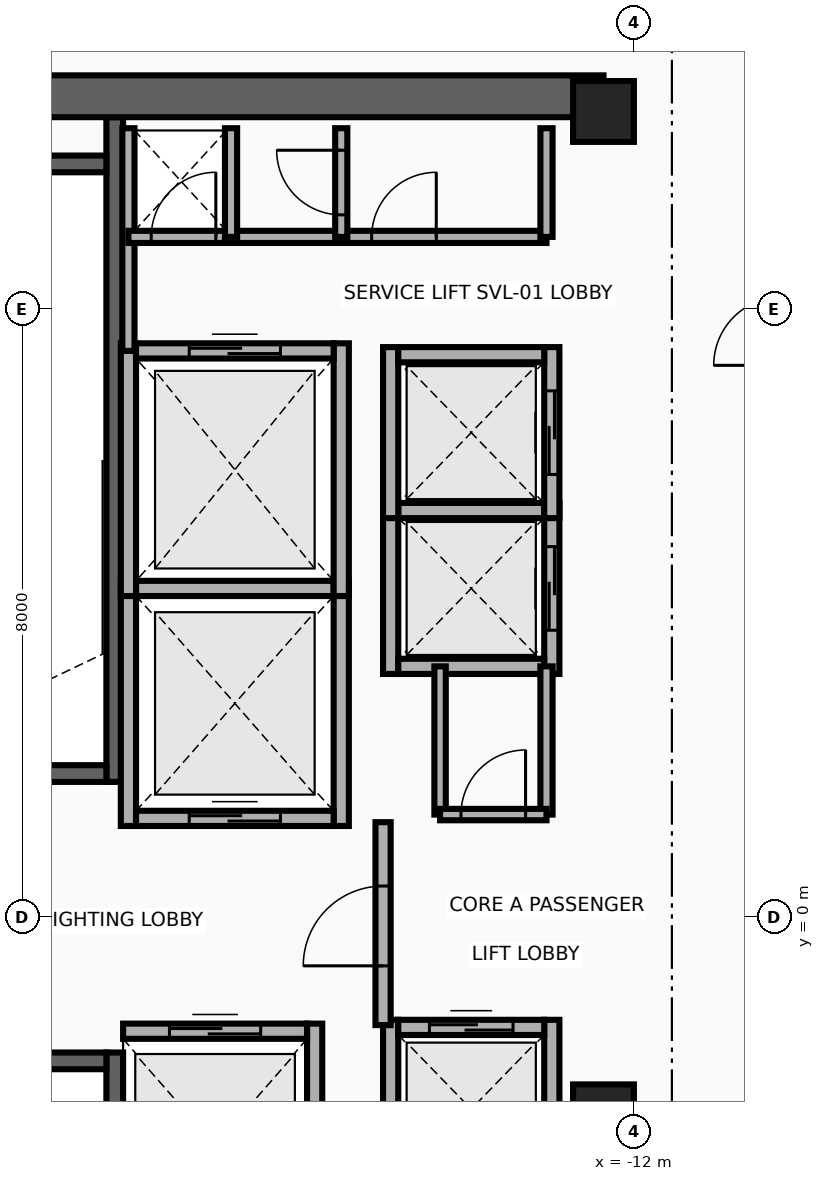
"""IFC4 building model, lengths in metres.
Left out: names, types, materials, properties, quantities, classifications, styles, units other than length and angle.
Written with IfcOpenShell. Run it as: python <this file> out.ifc"""

import sys

from ifc_helpers import new_model, si_unit, direction, frame, frame_2d, origin, origin_2d, place, context, subcontext, project, spatial, rectangle, extrude, source, transform, mapped, element, fill, save


model = new_model("IFC4")
c1 = context("Model", 3, precision=1e-05, world=origin(), true_north=direction((0.0, 1.0)))
c2 = subcontext(c1, "Body", "Model", "MODEL_VIEW")
j1 = project(units=[si_unit("LENGTHUNIT", "METRE"), si_unit("PLANEANGLEUNIT", "RADIAN")], contexts=[c1])
p1 = place(None, origin())
s1 = spatial("IfcSite", under=j1, at=p1, CompositionType="ELEMENT")
p2 = place(p1, origin())
s2 = spatial("IfcBuilding", under=s1, at=p2, CompositionType="ELEMENT")
p3 = place(p2, frame((0.0, 0.0, 254.5)))
s3 = spatial("IfcBuildingStorey", under=s2, at=p3, CompositionType="ELEMENT", Elevation=254.5)
p4 = place(p3, frame((-18.83, 1.78, 0.0), z_axis=(0.0, 0.0, 1.0), x_axis=(0.0, 1.0, 0.0)))
e1 = element("IfcWall", 1, at=p4, inside=s3, PredefinedType="SHEAR", context=c2, shape_type="SweptSolid", body=[
    extrude(rectangle(XDim=8.745, YDim=0.22, at=frame_2d((4.373, 0.0))), origin(), (0.0, 0.0, 1.0), 3.26),
])
p5 = place(p3, frame((-22.05, 1.89, 0.0), z_axis=(0.0, 0.0, 1.0), x_axis=(1.0, 0.0, 0.0)))
e2 = element("IfcWall", 2, at=p5, inside=s3, PredefinedType="SHEAR", context=c2, shape_type="SweptSolid", body=[
    extrude(rectangle(XDim=3.11, YDim=0.22, at=frame_2d((1.555, 0.0))), origin(), (0.0, 0.0, 1.0), 3.26),
])
p6 = place(p5, frame((1.0, 0.0, 0.0)))
e3 = element("IfcOpeningElement", 3, at=p6, cuts=e2, PredefinedType="OPENING", context=c2, shape_type="SweptSolid", body=[
    extrude(rectangle(XDim=1.1, YDim=2.15, at=frame_2d((0.55, 1.075))), frame((0.0, 0.125, 0.0), z_axis=(0.0, -1.0, 0.0), x_axis=(1.0, 0.0, 0.0)), (0.0, 0.0, 1.0), 0.25),
])
p7 = place(p3, frame((-22.05, 9.91, 0.0), z_axis=(0.0, 0.0, 1.0), x_axis=(1.0, 0.0, 0.0)))
e4 = element("IfcWall", 4, at=p7, inside=s3, PredefinedType="SHEAR", context=c2, shape_type="SweptSolid", body=[
    extrude(rectangle(XDim=3.11, YDim=0.22, at=frame_2d((1.555, 0.0))), origin(), (0.0, 0.0, 1.0), 3.26),
])
p8 = place(p3, frame((-18.83, -10.525, 0.0), z_axis=(0.0, 0.0, 1.0), x_axis=(0.0, 1.0, 0.0)))
e5 = element("IfcWall", 5, at=p8, inside=s3, PredefinedType="SHEAR", context=c2, shape_type="SweptSolid", body=[
    extrude(rectangle(XDim=8.745, YDim=0.22, at=frame_2d((4.373, 0.0))), origin(), (0.0, 0.0, 1.0), 3.26),
])
p9 = place(p3, frame((-22.05, -1.89, 0.0), z_axis=(0.0, 0.0, 1.0), x_axis=(1.0, 0.0, 0.0)))
e6 = element("IfcWall", 6, at=p9, inside=s3, PredefinedType="SHEAR", context=c2, shape_type="SweptSolid", body=[
    extrude(rectangle(XDim=3.11, YDim=0.22, at=frame_2d((1.555, 0.0))), origin(), (0.0, 0.0, 1.0), 3.26),
])
p10 = place(p9, frame((1.0, 0.0, 0.0)))
e7 = element("IfcOpeningElement", 7, at=p10, cuts=e6, PredefinedType="OPENING", context=c2, shape_type="SweptSolid", body=[
    extrude(rectangle(XDim=1.1, YDim=2.15, at=frame_2d((0.55, 1.075))), frame((0.0, 0.125, 0.0), z_axis=(0.0, -1.0, 0.0), x_axis=(1.0, 0.0, 0.0)), (0.0, 0.0, 1.0), 0.25),
])
p11 = place(p3, frame((-22.65, 10.8, 0.0), z_axis=(0.0, 0.0, 1.0), x_axis=(1.0, 0.0, 0.0)))
e8 = element("IfcWall", 8, at=p11, inside=s3, PredefinedType="SHEAR", context=c2, shape_type="SweptSolid", body=[
    extrude(rectangle(XDim=10.25, YDim=0.55, at=frame_2d((5.125, 0.0))), origin(), (0.0, 0.0, 1.0), 3.26),
])
m1 = source(origin(), c2, "Body", "SweptSolid", [
    extrude(rectangle(XDim=0.8, YDim=0.8, at=origin_2d()), origin(), (0.0, 0.0, 1.0), 3.5),
])
for number, where, z_axis, x_axis in (
    (9, (-12.4, -2.6, 0.0), (0.0, 0.0, 1.0), (1.0, 0.0, 0.0)),
    (10, (-12.4, 10.6, 0.0), (0.0, 0.0, 1.0), (1.0, 0.0, 0.0)),
):
    element("IfcColumn", number, at=place(p3, frame(where, z_axis=z_axis, x_axis=x_axis)), inside=s3, PredefinedType="COLUMN", context=c2, shape_type="MappedRepresentation", body=[
        mapped(m1, transform((0.0, 0.0, 0.0), x_axis=(1.0, 0.0, 0.0), y_axis=(0.0, 1.0, 0.0), z_axis=(0.0, 0.0, 1.0), scale=1.0)),
    ])
for number, where, z_axis, x_axis in (
    (11, (-18.65, 1.2, 0.0), (0.0, 0.0, 1.0), (0.0, 1.0, 0.0)),
    (12, (-15.85, 1.2, 0.0), (0.0, 0.0, 1.0), (0.0, 1.0, 0.0)),
):
    element("IfcWall", number, at=place(p3, frame(where, z_axis=z_axis, x_axis=x_axis)), inside=s3, PredefinedType="MOVABLE", context=c2, shape_type="SweptSolid", body=[
        extrude(rectangle(XDim=3.225, YDim=0.2, at=frame_2d((1.613, 0.0))), origin(), (0.0, 0.0, 1.0), 3.26),
    ])
p12 = place(p3, frame((-18.55, 1.3, 0.0), z_axis=(0.0, 0.0, 1.0), x_axis=(1.0, 0.0, 0.0)))
e13 = element("IfcWall", 13, at=p12, inside=s3, PredefinedType="MOVABLE", context=c2, shape_type="SweptSolid", body=[
    extrude(rectangle(XDim=2.6, YDim=0.2, at=frame_2d((1.3, 0.0))), origin(), (0.0, 0.0, 1.0), 3.26),
])
p13 = place(p12, frame((0.7, 0.0, 0.0)))
e14 = element("IfcOpeningElement", 14, at=p13, cuts=e13, PredefinedType="OPENING", context=c2, shape_type="SweptSolid", body=[
    extrude(rectangle(XDim=1.2, YDim=2.1, at=frame_2d((0.6, 1.05))), frame((0.0, 0.115, 0.0), z_axis=(0.0, -1.0, 0.0), x_axis=(1.0, 0.0, 0.0)), (0.0, 0.0, 1.0), 0.23),
])
p14 = place(p3, frame((-18.55, 4.325, 0.0), z_axis=(0.0, 0.0, 1.0), x_axis=(1.0, 0.0, 0.0)))
e15 = element("IfcWall", 15, at=p14, inside=s3, PredefinedType="MOVABLE", context=c2, shape_type="SweptSolid", body=[
    extrude(rectangle(XDim=2.6, YDim=0.2, at=frame_2d((1.3, 0.0))), origin(), (0.0, 0.0, 1.0), 3.26),
])
p15 = place(p3, frame((-16.2, -4.6, 0.0), z_axis=(0.0, 0.0, 1.0), x_axis=(0.0, 1.0, 0.0)))
e16 = element("IfcWall", 16, at=p15, inside=s3, PredefinedType="MOVABLE", context=c2, shape_type="SweptSolid", body=[
    extrude(rectangle(XDim=3.2, YDim=0.2, at=frame_2d((1.6, 0.0))), origin(), (0.0, 0.0, 1.0), 3.26),
])
p16 = place(p3, frame((-18.72, -1.5, 0.0), z_axis=(0.0, 0.0, 1.0), x_axis=(1.0, 0.0, 0.0)))
e17 = element("IfcWall", 17, at=p16, inside=s3, PredefinedType="MOVABLE", context=c2, shape_type="SweptSolid", body=[
    extrude(rectangle(XDim=2.42, YDim=0.2, at=frame_2d((1.21, 0.0))), origin(), (0.0, 0.0, 1.0), 3.26),
])
p17 = place(p16, frame((0.61, 0.0, 0.0)))
e18 = element("IfcOpeningElement", 18, at=p17, cuts=e17, PredefinedType="OPENING", context=c2, shape_type="SweptSolid", body=[
    extrude(rectangle(XDim=1.2, YDim=2.1, at=frame_2d((0.6, 1.05))), frame((0.0, 0.115, 0.0), z_axis=(0.0, -1.0, 0.0), x_axis=(1.0, 0.0, 0.0)), (0.0, 0.0, 1.0), 0.23),
])
for number, where, z_axis, x_axis in (
    (19, (-18.65, 4.225, 0.0), (0.0, 0.0, 1.0), (0.0, 1.0, 0.0)),
    (20, (-15.85, 4.225, 0.0), (0.0, 0.0, 1.0), (0.0, 1.0, 0.0)),
):
    element("IfcWall", number, at=place(p3, frame(where, z_axis=z_axis, x_axis=x_axis)), inside=s3, PredefinedType="MOVABLE", context=c2, shape_type="SweptSolid", body=[
        extrude(rectangle(XDim=3.325, YDim=0.2, at=frame_2d((1.663, 0.0))), origin(), (0.0, 0.0, 1.0), 3.26),
    ])
p18 = place(p3, frame((-18.55, 7.45, 0.0), z_axis=(0.0, 0.0, 1.0), x_axis=(1.0, 0.0, 0.0)))
e21 = element("IfcWall", 21, at=p18, inside=s3, PredefinedType="MOVABLE", context=c2, shape_type="SweptSolid", body=[
    extrude(rectangle(XDim=2.6, YDim=0.2, at=frame_2d((1.3, 0.0))), origin(), (0.0, 0.0, 1.0), 3.26),
])
p19 = place(p18, frame((0.7, 0.0, 0.0)))
e22 = element("IfcOpeningElement", 22, at=p19, cuts=e21, PredefinedType="OPENING", context=c2, shape_type="SweptSolid", body=[
    extrude(rectangle(XDim=1.2, YDim=2.1, at=frame_2d((0.6, 1.05))), frame((0.0, 0.115, 0.0), z_axis=(0.0, -1.0, 0.0), x_axis=(1.0, 0.0, 0.0)), (0.0, 0.0, 1.0), 0.23),
])
p20 = place(p3, frame((-15.2, 3.2, 0.0), z_axis=(0.0, 0.0, 1.0), x_axis=(0.0, 1.0, 0.0)))
e23 = element("IfcWall", 23, at=p20, inside=s3, PredefinedType="MOVABLE", context=c2, shape_type="SweptSolid", body=[
    extrude(rectangle(XDim=2.25, YDim=0.2, at=frame_2d((1.125, 0.0))), origin(), (0.0, 0.0, 1.0), 3.26),
])
p21 = place(p3, frame((-13.08, 3.2, 0.0), z_axis=(0.0, 0.0, 1.0), x_axis=(0.0, 1.0, 0.0)))
e24 = element("IfcWall", 24, at=p21, inside=s3, PredefinedType="MOVABLE", context=c2, shape_type="SweptSolid", body=[
    extrude(rectangle(XDim=2.25, YDim=0.2, at=frame_2d((1.125, 0.0))), origin(), (0.0, 0.0, 1.0), 3.26),
])
p22 = place(p21, frame((0.575, 0.0, 0.0)))
e25 = element("IfcOpeningElement", 25, at=p22, cuts=e24, PredefinedType="OPENING", context=c2, shape_type="SweptSolid", body=[
    extrude(rectangle(XDim=1.1, YDim=2.1, at=frame_2d((0.55, 1.05))), frame((0.0, 0.115, 0.0), z_axis=(0.0, -1.0, 0.0), x_axis=(1.0, 0.0, 0.0)), (0.0, 0.0, 1.0), 0.23),
])
for number, where, z_axis, x_axis in (
    (26, (-15.1, 3.3, 0.0), (0.0, 0.0, 1.0), (1.0, 0.0, 0.0)),
    (27, (-15.1, 5.35, 0.0), (0.0, 0.0, 1.0), (1.0, 0.0, 0.0)),
):
    element("IfcWall", number, at=place(p3, frame(where, z_axis=z_axis, x_axis=x_axis)), inside=s3, PredefinedType="MOVABLE", context=c2, shape_type="SweptSolid", body=[
        extrude(rectangle(XDim=1.92, YDim=0.2, at=frame_2d((0.96, 0.0))), origin(), (0.0, 0.0, 1.0), 3.26),
    ])
p23 = place(p3, frame((-15.2, 5.25, 0.0), z_axis=(0.0, 0.0, 1.0), x_axis=(0.0, 1.0, 0.0)))
e28 = element("IfcWall", 28, at=p23, inside=s3, PredefinedType="MOVABLE", context=c2, shape_type="SweptSolid", body=[
    extrude(rectangle(XDim=2.25, YDim=0.2, at=frame_2d((1.125, 0.0))), origin(), (0.0, 0.0, 1.0), 3.26),
])
p24 = place(p3, frame((-13.08, 5.25, 0.0), z_axis=(0.0, 0.0, 1.0), x_axis=(0.0, 1.0, 0.0)))
e29 = element("IfcWall", 29, at=p24, inside=s3, PredefinedType="MOVABLE", context=c2, shape_type="SweptSolid", body=[
    extrude(rectangle(XDim=2.25, YDim=0.2, at=frame_2d((1.125, 0.0))), origin(), (0.0, 0.0, 1.0), 3.26),
])
p25 = place(p24, frame((0.575, 0.0, 0.0)))
e30 = element("IfcOpeningElement", 30, at=p25, cuts=e29, PredefinedType="OPENING", context=c2, shape_type="SweptSolid", body=[
    extrude(rectangle(XDim=1.1, YDim=2.1, at=frame_2d((0.55, 1.05))), frame((0.0, 0.115, 0.0), z_axis=(0.0, -1.0, 0.0), x_axis=(1.0, 0.0, 0.0)), (0.0, 0.0, 1.0), 0.23),
])
p26 = place(p3, frame((-15.1, 7.4, 0.0), z_axis=(0.0, 0.0, 1.0), x_axis=(1.0, 0.0, 0.0)))
e31 = element("IfcWall", 31, at=p26, inside=s3, PredefinedType="MOVABLE", context=c2, shape_type="SweptSolid", body=[
    extrude(rectangle(XDim=1.92, YDim=0.2, at=frame_2d((0.96, 0.0))), origin(), (0.0, 0.0, 1.0), 3.26),
])
for number, where, z_axis, x_axis in (
    (32, (-15.2, -3.7, 0.0), (0.0, 0.0, 1.0), (0.0, 1.0, 0.0)),
    (33, (-13.08, -3.7, 0.0), (0.0, 0.0, 1.0), (0.0, 1.0, 0.0)),
):
    element("IfcWall", number, at=place(p3, frame(where, z_axis=z_axis, x_axis=x_axis)), inside=s3, PredefinedType="MOVABLE", context=c2, shape_type="SweptSolid", body=[
        extrude(rectangle(XDim=2.35, YDim=0.2, at=frame_2d((1.175, 0.0))), origin(), (0.0, 0.0, 1.0), 3.26),
    ])
p27 = place(p3, frame((-15.1, -1.45, 0.0), z_axis=(0.0, 0.0, 1.0), x_axis=(1.0, 0.0, 0.0)))
e34 = element("IfcWall", 34, at=p27, inside=s3, PredefinedType="MOVABLE", context=c2, shape_type="SweptSolid", body=[
    extrude(rectangle(XDim=1.92, YDim=0.2, at=frame_2d((0.96, 0.0))), origin(), (0.0, 0.0, 1.0), 3.26),
])
p28 = place(p27, frame((0.41, 0.0, 0.0)))
e35 = element("IfcOpeningElement", 35, at=p28, cuts=e34, PredefinedType="OPENING", context=c2, shape_type="SweptSolid", body=[
    extrude(rectangle(XDim=1.1, YDim=2.1, at=frame_2d((0.55, 1.05))), frame((0.0, 0.115, 0.0), z_axis=(0.0, -1.0, 0.0), x_axis=(1.0, 0.0, 0.0)), (0.0, 0.0, 1.0), 0.23),
])
p29 = place(p3, frame((-15.3, -1.42, 0.0), z_axis=(0.0, 0.0, 1.0), x_axis=(0.0, 1.0, 0.0)))
e36 = element("IfcWall", 36, at=p29, inside=s3, PredefinedType="PARTITIONING", context=c2, shape_type="SweptSolid", body=[
    extrude(rectangle(XDim=2.67, YDim=0.2, at=frame_2d((1.335, 0.0))), origin(), (0.0, 0.0, 1.0), 3.26),
])
p30 = place(p29, frame((0.78, 0.0, 0.0)))
e37 = element("IfcOpeningElement", 37, at=p30, cuts=e36, PredefinedType="OPENING", context=c2, shape_type="SweptSolid", body=[
    extrude(rectangle(XDim=1.05, YDim=2.15, at=frame_2d((0.525, 1.075))), frame((0.0, 0.115, 0.0), z_axis=(0.0, -1.0, 0.0), x_axis=(1.0, 0.0, 0.0)), (0.0, 0.0, 1.0), 0.23),
])
p31 = place(p3, frame((-18.65, 7.45, 0.0), z_axis=(0.0, 0.0, 1.0), x_axis=(0.0, 1.0, 0.0)))
e38 = element("IfcWall", 38, at=p31, inside=s3, PredefinedType="PARTITIONING", context=c2, shape_type="SweptSolid", body=[
    extrude(rectangle(XDim=2.93, YDim=0.16, at=frame_2d((1.465, 0.0))), origin(), (0.0, 0.0, 1.0), 3.26),
])
p32 = place(p3, frame((-18.65, 8.95, 0.0), z_axis=(0.0, 0.0, 1.0), x_axis=(1.0, 0.0, 0.0)))
e39 = element("IfcWall", 39, at=p32, inside=s3, PredefinedType="PARTITIONING", context=c2, shape_type="SweptSolid", body=[
    extrude(rectangle(XDim=5.5, YDim=0.16, at=frame_2d((2.75, 0.0))), origin(), (0.0, 0.0, 1.0), 3.26),
])
p33 = place(p32, frame((0.3, 0.0, 0.0)))
e40 = element("IfcOpeningElement", 40, at=p33, cuts=e39, PredefinedType="OPENING", context=c2, shape_type="SweptSolid", body=[
    extrude(rectangle(XDim=0.85, YDim=2.05, at=frame_2d((0.425, 1.025))), frame((0.0, 0.095, 0.0), z_axis=(0.0, -1.0, 0.0), x_axis=(1.0, 0.0, 0.0)), (0.0, 0.0, 1.0), 0.19),
])
p34 = place(p32, frame((3.2, 0.0, 0.0)))
e41 = element("IfcOpeningElement", 41, at=p34, cuts=e39, PredefinedType="OPENING", context=c2, shape_type="SweptSolid", body=[
    extrude(rectangle(XDim=0.85, YDim=2.05, at=frame_2d((0.425, 1.025))), frame((0.0, 0.095, 0.0), z_axis=(0.0, -1.0, 0.0), x_axis=(1.0, 0.0, 0.0)), (0.0, 0.0, 1.0), 0.19),
])
for number, where, z_axis, x_axis in (
    (42, (-13.15, 8.95, 0.0), (0.0, 0.0, 1.0), (0.0, 1.0, 0.0)),
    (43, (-17.3, 8.95, 0.0), (0.0, 0.0, 1.0), (0.0, 1.0, 0.0)),
):
    element("IfcWall", number, at=place(p3, frame(where, z_axis=z_axis, x_axis=x_axis)), inside=s3, PredefinedType="PARTITIONING", context=c2, shape_type="SweptSolid", body=[
        extrude(rectangle(XDim=1.43, YDim=0.16, at=frame_2d((0.715, 0.0))), origin(), (0.0, 0.0, 1.0), 3.26),
    ])
p35 = place(p3, frame((-15.85, 8.95, 0.0), z_axis=(0.0, 0.0, 1.0), x_axis=(0.0, 1.0, 0.0)))
e44 = element("IfcWall", 44, at=p35, inside=s3, PredefinedType="PARTITIONING", context=c2, shape_type="SweptSolid", body=[
    extrude(rectangle(XDim=1.43, YDim=0.16, at=frame_2d((0.715, 0.0))), origin(), (0.0, 0.0, 1.0), 3.26),
])
p36 = place(p35, frame((0.29, 0.0, 0.0)))
e45 = element("IfcOpeningElement", 45, at=p36, cuts=e44, PredefinedType="OPENING", context=c2, shape_type="SweptSolid", body=[
    extrude(rectangle(XDim=0.85, YDim=2.05, at=frame_2d((0.425, 1.025))), frame((0.0, 0.095, 0.0), z_axis=(0.0, -1.0, 0.0), x_axis=(1.0, 0.0, 0.0)), (0.0, 0.0, 1.0), 0.19),
])
p37 = place(p3, frame((-13.15, 1.35, 0.0), z_axis=(0.0, 0.0, 1.0), x_axis=(0.0, 1.0, 0.0)))
e46 = element("IfcWall", 46, at=p37, inside=s3, PredefinedType="PARTITIONING", context=c2, shape_type="SweptSolid", body=[
    extrude(rectangle(XDim=1.95, YDim=0.16, at=frame_2d((0.975, 0.0))), origin(), (0.0, 0.0, 1.0), 3.26),
])
p38 = place(p3, frame((-14.55, 1.35, 0.0), z_axis=(0.0, 0.0, 1.0), x_axis=(0.0, 1.0, 0.0)))
e47 = element("IfcWall", 47, at=p38, inside=s3, PredefinedType="PARTITIONING", context=c2, shape_type="SweptSolid", body=[
    extrude(rectangle(XDim=1.95, YDim=0.15, at=frame_2d((0.975, 0.0))), origin(), (0.0, 0.0, 1.0), 3.26),
])
p39 = place(p3, frame((-14.55, 1.35, 0.0), z_axis=(0.0, 0.0, 1.0), x_axis=(1.0, 0.0, 0.0)))
e48 = element("IfcWall", 48, at=p39, inside=s3, PredefinedType="PARTITIONING", context=c2, shape_type="SweptSolid", body=[
    extrude(rectangle(XDim=1.4, YDim=0.15, at=frame_2d((0.7, 0.0))), origin(), (0.0, 0.0, 1.0), 3.26),
])
p40 = place(p39, frame((0.275, 0.0, 0.0)))
e49 = element("IfcOpeningElement", 49, at=p40, cuts=e48, PredefinedType="OPENING", context=c2, shape_type="SweptSolid", body=[
    extrude(rectangle(XDim=0.85, YDim=2.05, at=frame_2d((0.425, 1.025))), frame((0.0, 0.09, 0.0), z_axis=(0.0, -1.0, 0.0), x_axis=(1.0, 0.0, 0.0)), (0.0, 0.0, 1.0), 0.18),
])
p41 = place(p13, origin())
e50 = element("IfcDoor", 50, at=p41, inside=s3, OperationType="DOUBLE_DOOR_SLIDING", PredefinedType="DOOR", context=c2, shape_type="SweptSolid", body=[
    extrude(rectangle(XDim=1.2, YDim=2.1, at=frame_2d((0.6, 1.05))), frame((0.0, 0.025, 0.0), z_axis=(0.0, -1.0, 0.0), x_axis=(1.0, 0.0, 0.0)), (0.0, 0.0, 1.0), 0.05),
])
fill(e14, e50)
p42 = place(p17, origin())
e51 = element("IfcDoor", 51, at=p42, inside=s3, OperationType="DOUBLE_DOOR_SLIDING", PredefinedType="DOOR", context=c2, shape_type="SweptSolid", body=[
    extrude(rectangle(XDim=1.2, YDim=2.1, at=frame_2d((0.6, 1.05))), frame((0.0, 0.025, 0.0), z_axis=(0.0, -1.0, 0.0), x_axis=(1.0, 0.0, 0.0)), (0.0, 0.0, 1.0), 0.05),
])
fill(e18, e51)
p43 = place(p19, origin())
e52 = element("IfcDoor", 52, at=p43, inside=s3, OperationType="DOUBLE_DOOR_SLIDING", PredefinedType="DOOR", context=c2, shape_type="SweptSolid", body=[
    extrude(rectangle(XDim=1.2, YDim=2.1, at=frame_2d((0.6, 1.05))), frame((0.0, 0.025, 0.0), z_axis=(0.0, -1.0, 0.0), x_axis=(1.0, 0.0, 0.0)), (0.0, 0.0, 1.0), 0.05),
])
fill(e22, e52)
p44 = place(p22, origin())
e53 = element("IfcDoor", 53, at=p44, inside=s3, OperationType="DOUBLE_DOOR_SLIDING", PredefinedType="DOOR", context=c2, shape_type="SweptSolid", body=[
    extrude(rectangle(XDim=1.1, YDim=2.1, at=frame_2d((0.55, 1.05))), frame((0.0, 0.025, 0.0), z_axis=(0.0, -1.0, 0.0), x_axis=(1.0, 0.0, 0.0)), (0.0, 0.0, 1.0), 0.05),
])
fill(e25, e53)
p45 = place(p25, origin())
e54 = element("IfcDoor", 54, at=p45, inside=s3, OperationType="DOUBLE_DOOR_SLIDING", PredefinedType="DOOR", context=c2, shape_type="SweptSolid", body=[
    extrude(rectangle(XDim=1.1, YDim=2.1, at=frame_2d((0.55, 1.05))), frame((0.0, 0.025, 0.0), z_axis=(0.0, -1.0, 0.0), x_axis=(1.0, 0.0, 0.0)), (0.0, 0.0, 1.0), 0.05),
])
fill(e30, e54)
p46 = place(p28, origin())
e55 = element("IfcDoor", 55, at=p46, inside=s3, OperationType="DOUBLE_DOOR_SLIDING", PredefinedType="DOOR", context=c2, shape_type="SweptSolid", body=[
    extrude(rectangle(XDim=1.1, YDim=2.1, at=frame_2d((0.55, 1.05))), frame((0.0, 0.025, 0.0), z_axis=(0.0, -1.0, 0.0), x_axis=(1.0, 0.0, 0.0)), (0.0, 0.0, 1.0), 0.05),
])
fill(e35, e55)
p47 = place(p30, origin())
e56 = element("IfcDoor", 56, at=p47, inside=s3, OperationType="SINGLE_SWING_RIGHT", PredefinedType="DOOR", context=c2, shape_type="SweptSolid", body=[
    extrude(rectangle(XDim=1.05, YDim=2.15, at=frame_2d((0.525, 1.075))), frame((0.0, 0.025, 0.0), z_axis=(0.0, -1.0, 0.0), x_axis=(1.0, 0.0, 0.0)), (0.0, 0.0, 1.0), 0.05),
])
fill(e37, e56)
p48 = place(p33, origin())
e57 = element("IfcDoor", 57, at=p48, inside=s3, OperationType="SINGLE_SWING_LEFT", PredefinedType="DOOR", context=c2, shape_type="SweptSolid", body=[
    extrude(rectangle(XDim=0.85, YDim=2.05, at=frame_2d((0.425, 1.025))), frame((0.0, 0.025, 0.0), z_axis=(0.0, -1.0, 0.0), x_axis=(1.0, 0.0, 0.0)), (0.0, 0.0, 1.0), 0.05),
])
fill(e40, e57)
p49 = place(p34, origin())
e58 = element("IfcDoor", 58, at=p49, inside=s3, OperationType="SINGLE_SWING_RIGHT", PredefinedType="DOOR", context=c2, shape_type="SweptSolid", body=[
    extrude(rectangle(XDim=0.85, YDim=2.05, at=frame_2d((0.425, 1.025))), frame((0.0, 0.025, 0.0), z_axis=(0.0, -1.0, 0.0), x_axis=(1.0, 0.0, 0.0)), (0.0, 0.0, 1.0), 0.05),
])
fill(e41, e58)
p50 = place(p36, origin())
e59 = element("IfcDoor", 59, at=p50, inside=s3, OperationType="SINGLE_SWING_LEFT", PredefinedType="DOOR", context=c2, shape_type="SweptSolid", body=[
    extrude(rectangle(XDim=0.85, YDim=2.05, at=frame_2d((0.425, 1.025))), frame((0.0, 0.025, 0.0), z_axis=(0.0, -1.0, 0.0), x_axis=(1.0, 0.0, 0.0)), (0.0, 0.0, 1.0), 0.05),
])
fill(e45, e59)
p51 = place(p40, origin())
e60 = element("IfcDoor", 60, at=p51, inside=s3, OperationType="SINGLE_SWING_RIGHT", PredefinedType="DOOR", context=c2, shape_type="SweptSolid", body=[
    extrude(rectangle(XDim=0.85, YDim=2.05, at=frame_2d((0.425, 1.025))), frame((0.0, 0.025, 0.0), z_axis=(0.0, -1.0, 0.0), x_axis=(1.0, 0.0, 0.0)), (0.0, 0.0, 1.0), 0.05),
])
fill(e49, e60)
save(model, sys.argv[1])
